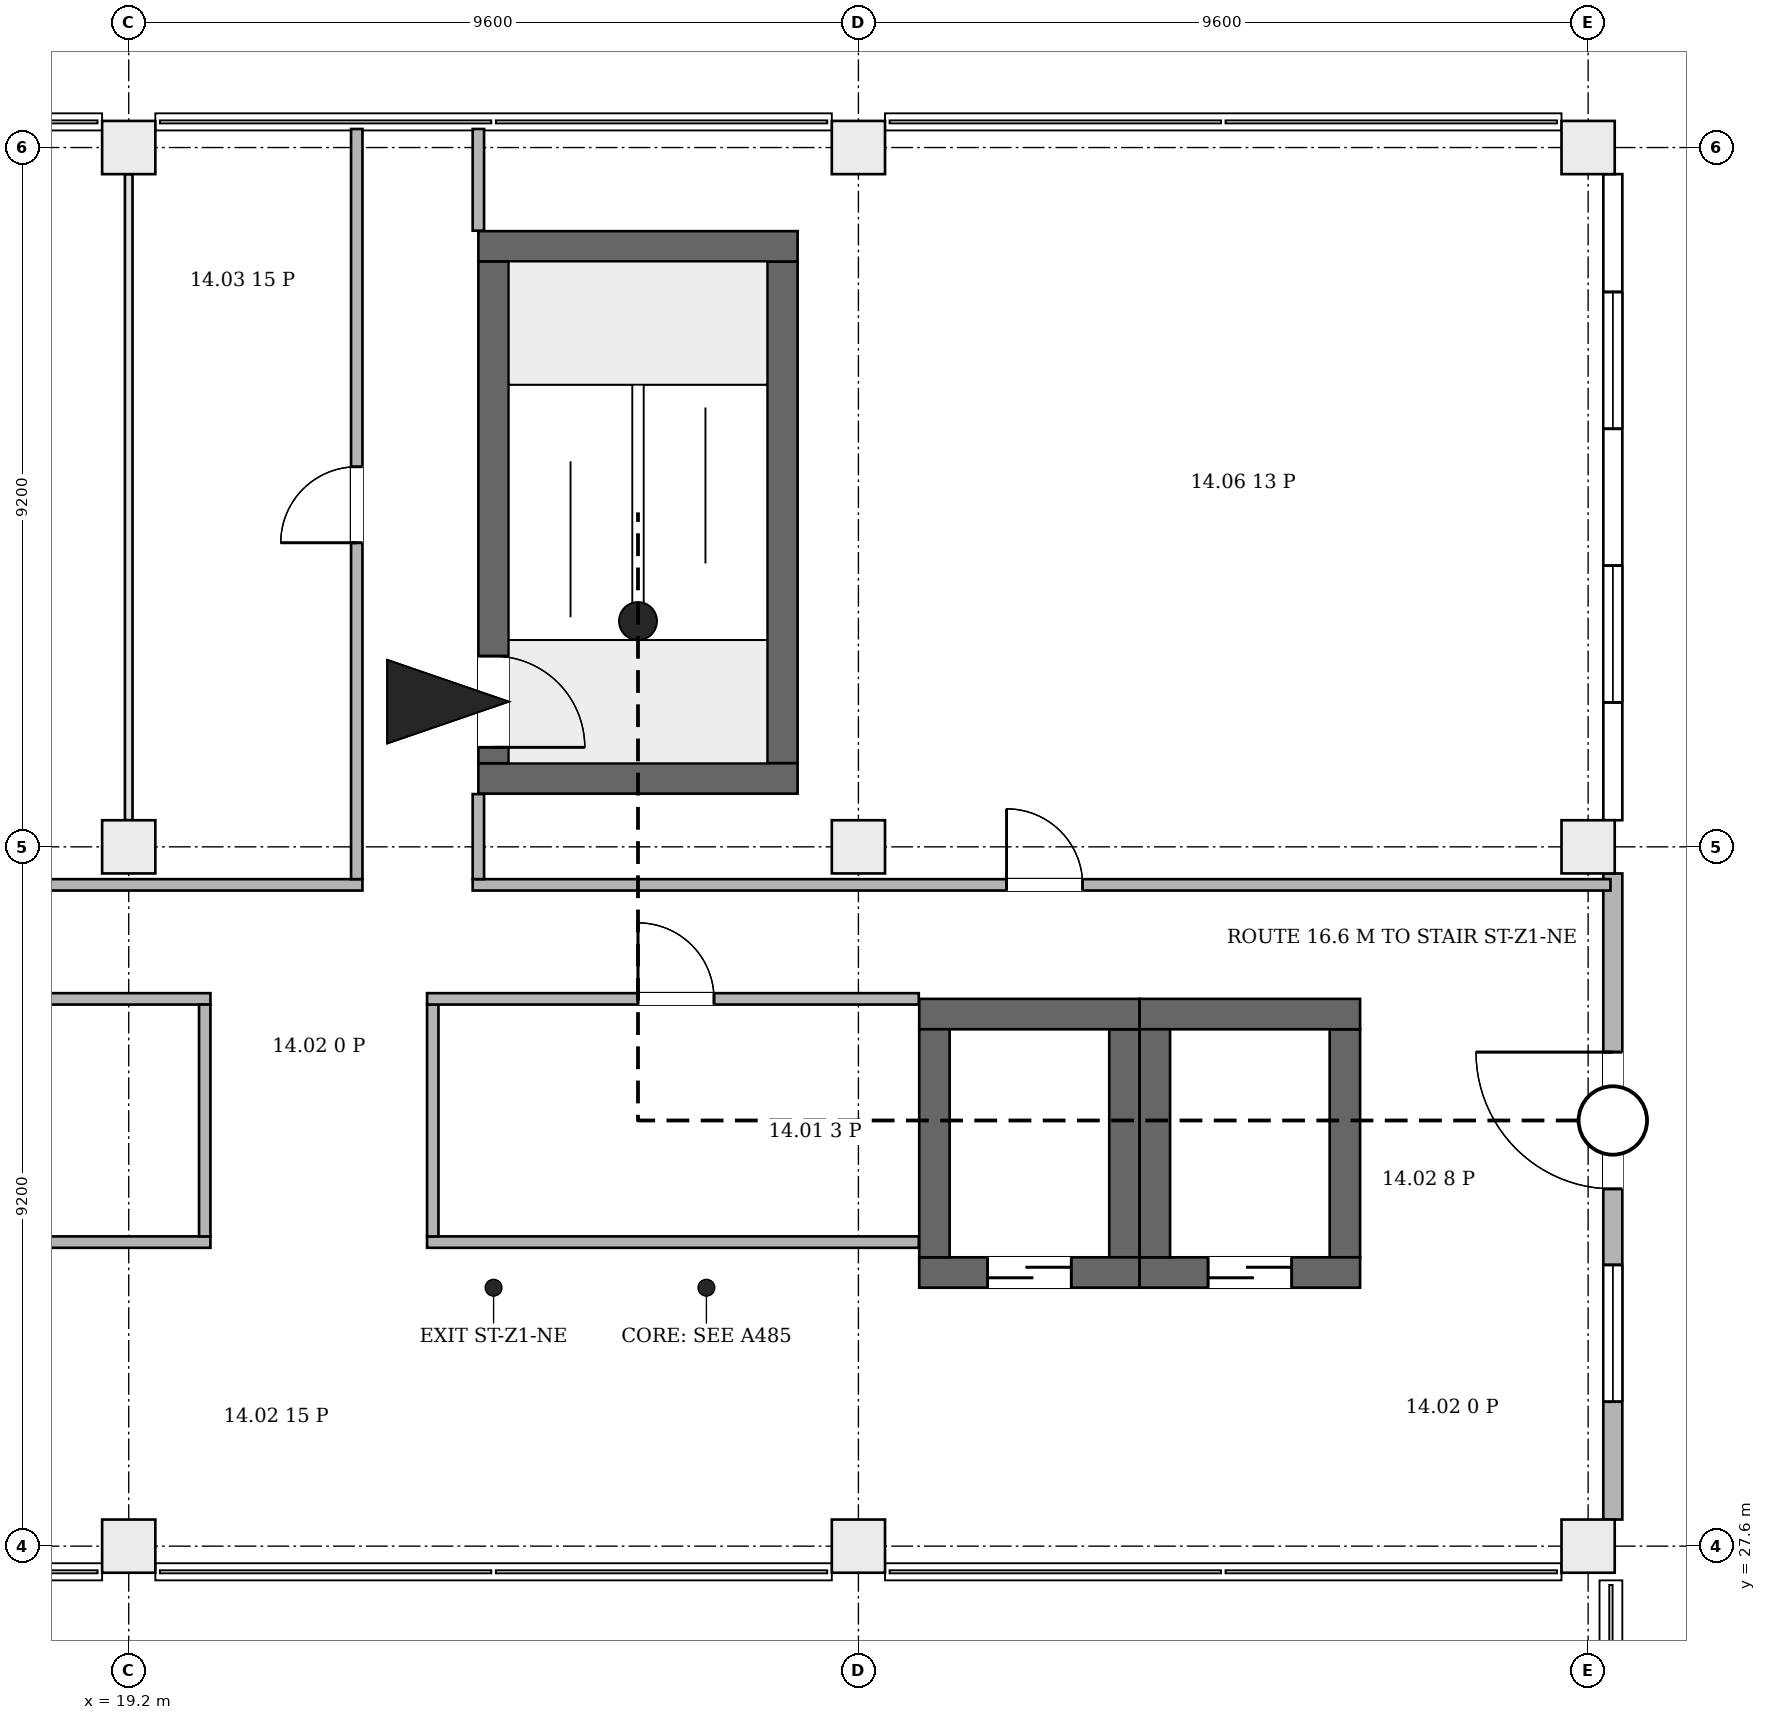
"""IFC4 building model, lengths in metres.
Left out: names, types, materials, properties, quantities, classifications, styles, units other than length and angle.
Written with IfcOpenShell. Run it as: python <this file> out.ifc"""

import sys

from ifc_helpers import new_model, si_unit, direction, frame, frame_2d, origin, origin_2d, place, context, subcontext, project, spatial, rectangle, extrude, element, fill, save


model = new_model("IFC4")
c1 = context("Model", 3, precision=1e-05, world=origin(), true_north=direction((0.0, 1.0)))
c2 = subcontext(c1, "Body", "Model", "MODEL_VIEW")
j1 = project(units=[si_unit("LENGTHUNIT", "METRE"), si_unit("PLANEANGLEUNIT", "RADIAN")], contexts=[c1])
p1 = place(None, origin())
s1 = spatial("IfcSite", under=j1, at=p1, CompositionType="ELEMENT")
p2 = place(p1, origin())
s2 = spatial("IfcBuilding", under=s1, at=p2, CompositionType="ELEMENT")
p3 = place(p2, frame((0.0, 0.0, 69.7)))
s3 = spatial("IfcBuildingStorey", under=s2, at=p3, CompositionType="ELEMENT", Elevation=69.7)
for number, where, z_axis, x_axis in (
    (1, (23.8, 37.7, 0.0), (0.0, 0.0, 1.0), (1.0, 0.0, 0.0)),
    (2, (23.8, 44.7, 0.0), (0.0, 0.0, 1.0), (1.0, 0.0, 0.0)),
):
    element("IfcWall", number, at=place(p3, frame(where, z_axis=z_axis, x_axis=x_axis)), inside=s3, PredefinedType="SHEAR", context=c2, shape_type="SweptSolid", body=[
        extrude(rectangle(XDim=4.2, YDim=0.4, at=frame_2d((2.1, 0.0))), origin(), (0.0, 0.0, 1.0), 4.2),
    ])
p4 = place(p3, frame((24.0, 37.9, 0.0), z_axis=(0.0, 0.0, 1.0), x_axis=(0.0, 1.0, 0.0)))
e3 = element("IfcWall", 3, at=p4, inside=s3, PredefinedType="SHEAR", context=c2, shape_type="SweptSolid", body=[
    extrude(rectangle(XDim=6.6, YDim=0.4, at=frame_2d((3.3, 0.0))), origin(), (0.0, 0.0, 1.0), 4.2),
])
p5 = place(p4, frame((0.21, 0.0, 0.0)))
e4 = element("IfcOpeningElement", 4, at=p5, cuts=e3, PredefinedType="OPENING", context=c2, shape_type="SweptSolid", body=[
    extrude(rectangle(XDim=1.2, YDim=2.1, at=frame_2d((0.6, 1.05))), frame((0.0, 0.21, 0.0), z_axis=(0.0, -1.0, 0.0), x_axis=(1.0, 0.0, 0.0)), (0.0, 0.0, 1.0), 0.42),
])
p6 = place(p3, frame((27.8, 37.9, 0.0), z_axis=(0.0, 0.0, 1.0), x_axis=(0.0, 1.0, 0.0)))
e5 = element("IfcWall", 5, at=p6, inside=s3, PredefinedType="SHEAR", context=c2, shape_type="SweptSolid", body=[
    extrude(rectangle(XDim=6.6, YDim=0.4, at=frame_2d((3.3, 0.0))), origin(), (0.0, 0.0, 1.0), 4.2),
])
p7 = place(p3, frame((29.6, 31.2, 0.0), z_axis=(0.0, 0.0, 1.0), x_axis=(1.0, 0.0, 0.0)))
e6 = element("IfcWall", 6, at=p7, inside=s3, PredefinedType="SHEAR", context=c2, shape_type="SweptSolid", body=[
    extrude(rectangle(XDim=2.9, YDim=0.4, at=frame_2d((1.45, 0.0))), origin(), (0.0, 0.0, 1.0), 4.2),
])
p8 = place(p7, frame((0.9, 0.0, 0.0)))
e7 = element("IfcOpeningElement", 7, at=p8, cuts=e6, PredefinedType="OPENING", context=c2, shape_type="SweptSolid", body=[
    extrude(rectangle(XDim=1.1, YDim=2.1, at=frame_2d((0.55, 1.05))), frame((0.0, 0.21, 0.0), z_axis=(0.0, -1.0, 0.0), x_axis=(1.0, 0.0, 0.0)), (0.0, 0.0, 1.0), 0.42),
])
p9 = place(p3, frame((29.6, 34.6, 0.0), z_axis=(0.0, 0.0, 1.0), x_axis=(1.0, 0.0, 0.0)))
e8 = element("IfcWall", 8, at=p9, inside=s3, PredefinedType="SHEAR", context=c2, shape_type="SweptSolid", body=[
    extrude(rectangle(XDim=2.9, YDim=0.4, at=frame_2d((1.45, 0.0))), origin(), (0.0, 0.0, 1.0), 4.2),
])
for number, where, z_axis, x_axis in (
    (9, (29.8, 31.4, 0.0), (0.0, 0.0, 1.0), (0.0, 1.0, 0.0)),
    (10, (32.3, 31.4, 0.0), (0.0, 0.0, 1.0), (0.0, 1.0, 0.0)),
):
    element("IfcWall", number, at=place(p3, frame(where, z_axis=z_axis, x_axis=x_axis)), inside=s3, PredefinedType="SHEAR", context=c2, shape_type="SweptSolid", body=[
        extrude(rectangle(XDim=3.0, YDim=0.4, at=frame_2d((1.5, 0.0))), origin(), (0.0, 0.0, 1.0), 4.2),
    ])
p10 = place(p3, frame((32.5, 31.2, 0.0), z_axis=(0.0, 0.0, 1.0), x_axis=(1.0, 0.0, 0.0)))
e11 = element("IfcWall", 11, at=p10, inside=s3, PredefinedType="SHEAR", context=c2, shape_type="SweptSolid", body=[
    extrude(rectangle(XDim=2.9, YDim=0.4, at=frame_2d((1.45, 0.0))), origin(), (0.0, 0.0, 1.0), 4.2),
])
p11 = place(p10, frame((0.9, 0.0, 0.0)))
e12 = element("IfcOpeningElement", 12, at=p11, cuts=e11, PredefinedType="OPENING", context=c2, shape_type="SweptSolid", body=[
    extrude(rectangle(XDim=1.1, YDim=2.1, at=frame_2d((0.55, 1.05))), frame((0.0, 0.21, 0.0), z_axis=(0.0, -1.0, 0.0), x_axis=(1.0, 0.0, 0.0)), (0.0, 0.0, 1.0), 0.42),
])
p12 = place(p3, frame((32.5, 34.6, 0.0), z_axis=(0.0, 0.0, 1.0), x_axis=(1.0, 0.0, 0.0)))
e13 = element("IfcWall", 13, at=p12, inside=s3, PredefinedType="SHEAR", context=c2, shape_type="SweptSolid", body=[
    extrude(rectangle(XDim=2.9, YDim=0.4, at=frame_2d((1.45, 0.0))), origin(), (0.0, 0.0, 1.0), 4.2),
])
for number, where, z_axis, x_axis in (
    (14, (32.7, 31.4, 0.0), (0.0, 0.0, 1.0), (0.0, 1.0, 0.0)),
    (15, (35.2, 31.4, 0.0), (0.0, 0.0, 1.0), (0.0, 1.0, 0.0)),
):
    element("IfcWall", number, at=place(p3, frame(where, z_axis=z_axis, x_axis=x_axis)), inside=s3, PredefinedType="SHEAR", context=c2, shape_type="SweptSolid", body=[
        extrude(rectangle(XDim=3.0, YDim=0.4, at=frame_2d((1.5, 0.0))), origin(), (0.0, 0.0, 1.0), 4.2),
    ])
for number, where, z_axis, x_axis in (
    (16, (19.2, 27.6, 0.0), (0.0, 0.0, 1.0), (1.0, 0.0, 0.0)),
    (17, (28.8, 27.6, 0.0), (0.0, 0.0, 1.0), (1.0, 0.0, 0.0)),
    (18, (38.4, 27.6, 0.0), (0.0, 0.0, 1.0), (1.0, 0.0, 0.0)),
    (19, (19.2, 36.8, 0.0), (0.0, 0.0, 1.0), (1.0, 0.0, 0.0)),
    (20, (28.8, 36.8, 0.0), (0.0, 0.0, 1.0), (1.0, 0.0, 0.0)),
    (21, (38.4, 36.8, 0.0), (0.0, 0.0, 1.0), (1.0, 0.0, 0.0)),
    (22, (19.2, 46.0, 0.0), (0.0, 0.0, 1.0), (1.0, 0.0, 0.0)),
    (23, (28.8, 46.0, 0.0), (0.0, 0.0, 1.0), (1.0, 0.0, 0.0)),
    (24, (38.4, 46.0, 0.0), (0.0, 0.0, 1.0), (1.0, 0.0, 0.0)),
):
    element("IfcColumn", number, at=place(p3, frame(where, z_axis=z_axis, x_axis=x_axis)), inside=s3, PredefinedType="COLUMN", context=c2, shape_type="SweptSolid", body=[
        extrude(rectangle(XDim=0.7, YDim=0.7, at=origin_2d()), origin(), (0.0, 0.0, 1.0), 4.2),
    ])
p13 = place(p3, frame((38.725, 27.95, 0.0), z_axis=(0.0, 0.0, 1.0), x_axis=(0.0, 1.0, 0.0)))
e25 = element("IfcWall", 25, at=p13, inside=s3, PredefinedType="ELEMENTEDWALL", context=c2, shape_type="SweptSolid", body=[
    extrude(rectangle(XDim=8.5, YDim=0.25, at=frame_2d((4.25, 0.0))), origin(), (0.0, 0.0, 1.0), 3.9),
])
p14 = place(p13, frame((4.35, 0.0, 0.0)))
e26 = element("IfcOpeningElement", 26, at=p14, cuts=e25, PredefinedType="OPENING", context=c2, shape_type="SweptSolid", body=[
    extrude(rectangle(XDim=1.8, YDim=2.4, at=frame_2d((0.9, 1.2))), frame((0.0, 0.135, 0.0), z_axis=(0.0, -1.0, 0.0), x_axis=(1.0, 0.0, 0.0)), (0.0, 0.0, 1.0), 0.27),
])
p15 = place(p13, frame((1.55, 0.0, 0.9)))
e27 = element("IfcOpeningElement", 27, at=p15, cuts=e25, PredefinedType="OPENING", context=c2, shape_type="SweptSolid", body=[
    extrude(rectangle(XDim=1.8, YDim=2.6, at=frame_2d((0.9, 1.3))), frame((0.0, 0.135, 0.0), z_axis=(0.0, -1.0, 0.0), x_axis=(1.0, 0.0, 0.0)), (0.0, 0.0, 1.0), 0.27),
])
p16 = place(p3, frame((38.725, 37.15, 0.0), z_axis=(0.0, 0.0, 1.0), x_axis=(0.0, 1.0, 0.0)))
e28 = element("IfcWall", 28, at=p16, inside=s3, PredefinedType="ELEMENTEDWALL", context=c2, shape_type="SweptSolid", body=[
    extrude(rectangle(XDim=8.5, YDim=0.25, at=frame_2d((4.25, 0.0))), origin(), (0.0, 0.0, 1.0), 3.9),
])
p17 = place(p16, frame((1.55, 0.0, 0.9)))
e29 = element("IfcOpeningElement", 29, at=p17, cuts=e28, PredefinedType="OPENING", context=c2, shape_type="SweptSolid", body=[
    extrude(rectangle(XDim=1.8, YDim=2.6, at=frame_2d((0.9, 1.3))), frame((0.0, 0.135, 0.0), z_axis=(0.0, -1.0, 0.0), x_axis=(1.0, 0.0, 0.0)), (0.0, 0.0, 1.0), 0.27),
])
p18 = place(p16, frame((5.15, 0.0, 0.9)))
e30 = element("IfcOpeningElement", 30, at=p18, cuts=e28, PredefinedType="OPENING", context=c2, shape_type="SweptSolid", body=[
    extrude(rectangle(XDim=1.8, YDim=2.6, at=frame_2d((0.9, 1.3))), frame((0.0, 0.135, 0.0), z_axis=(0.0, -1.0, 0.0), x_axis=(1.0, 0.0, 0.0)), (0.0, 0.0, 1.0), 0.27),
])
p19 = place(p3, frame((11.225, 36.3, 0.0), z_axis=(0.0, 0.0, 1.0), x_axis=(1.0, 0.0, 0.0)))
e31 = element("IfcWall", 31, at=p19, inside=s3, PredefinedType="PARTITIONING", context=c2, shape_type="SweptSolid", body=[
    extrude(rectangle(XDim=11.05, YDim=0.15, at=frame_2d((5.525, 0.0))), origin(), (0.0, 0.0, 1.0), 3.9),
])
p20 = place(p3, frame((13.425, 34.8, 0.0), z_axis=(0.0, 0.0, 1.0), x_axis=(1.0, 0.0, 0.0)))
e32 = element("IfcWall", 32, at=p20, inside=s3, PredefinedType="PARTITIONING", context=c2, shape_type="SweptSolid", body=[
    extrude(rectangle(XDim=6.85, YDim=0.15, at=frame_2d((3.425, 0.0))), origin(), (0.0, 0.0, 1.0), 3.9),
])
p21 = place(p20, frame((2.925, 0.0, 0.0)))
e33 = element("IfcOpeningElement", 33, at=p21, cuts=e32, PredefinedType="OPENING", context=c2, shape_type="SweptSolid", body=[
    extrude(rectangle(XDim=1.0, YDim=2.1, at=frame_2d((0.5, 1.05))), frame((0.0, 0.085, 0.0), z_axis=(0.0, -1.0, 0.0), x_axis=(1.0, 0.0, 0.0)), (0.0, 0.0, 1.0), 0.17),
])
p22 = place(p3, frame((13.506, 31.6, 0.0), z_axis=(0.0, 0.0, 1.0), x_axis=(1.0, 0.0, 0.0)))
e34 = element("IfcWall", 34, at=p22, inside=s3, PredefinedType="PARTITIONING", context=c2, shape_type="SweptSolid", body=[
    extrude(rectangle(XDim=6.769, YDim=0.15, at=frame_2d((3.384, 0.0))), origin(), (0.0, 0.0, 1.0), 3.9),
])
p23 = place(p3, frame((19.2, 37.15, 0.0), z_axis=(0.0, 0.0, 1.0), x_axis=(0.0, 1.0, 0.0)))
e35 = element("IfcWall", 35, at=p23, inside=s3, PredefinedType="PARTITIONING", context=c2, shape_type="SweptSolid", body=[
    extrude(rectangle(XDim=8.5, YDim=0.1, at=frame_2d((4.25, 0.0))), origin(), (0.0, 0.0, 1.0), 3.9),
])
p24 = place(p3, frame((20.2, 31.675, 0.0), z_axis=(0.0, 0.0, 1.0), x_axis=(0.0, 1.0, 0.0)))
e36 = element("IfcWall", 36, at=p24, inside=s3, PredefinedType="PARTITIONING", context=c2, shape_type="SweptSolid", body=[
    extrude(rectangle(XDim=3.05, YDim=0.15, at=frame_2d((1.525, 0.0))), origin(), (0.0, 0.0, 1.0), 3.9),
])
p25 = place(p3, frame((22.2, 36.375, 0.0), z_axis=(0.0, 0.0, 1.0), x_axis=(0.0, 1.0, 0.0)))
e37 = element("IfcWall", 37, at=p25, inside=s3, PredefinedType="PARTITIONING", context=c2, shape_type="SweptSolid", body=[
    extrude(rectangle(XDim=9.869, YDim=0.15, at=frame_2d((4.935, 0.0))), origin(), (0.0, 0.0, 1.0), 3.9),
])
p26 = place(p25, frame((4.425, 0.0, 0.0)))
e38 = element("IfcOpeningElement", 38, at=p26, cuts=e37, PredefinedType="OPENING", context=c2, shape_type="SweptSolid", body=[
    extrude(rectangle(XDim=1.0, YDim=2.1, at=frame_2d((0.5, 1.05))), frame((0.0, 0.085, 0.0), z_axis=(0.0, -1.0, 0.0), x_axis=(1.0, 0.0, 0.0)), (0.0, 0.0, 1.0), 0.17),
])
p27 = place(p3, frame((23.125, 31.6, 0.0), z_axis=(0.0, 0.0, 1.0), x_axis=(1.0, 0.0, 0.0)))
e39 = element("IfcWall", 39, at=p27, inside=s3, PredefinedType="PARTITIONING", context=c2, shape_type="SweptSolid", body=[
    extrude(rectangle(XDim=6.469, YDim=0.15, at=frame_2d((3.234, 0.0))), origin(), (0.0, 0.0, 1.0), 3.9),
])
p28 = place(p3, frame((23.2, 31.675, 0.0), z_axis=(0.0, 0.0, 1.0), x_axis=(0.0, 1.0, 0.0)))
e40 = element("IfcWall", 40, at=p28, inside=s3, PredefinedType="PARTITIONING", context=c2, shape_type="SweptSolid", body=[
    extrude(rectangle(XDim=3.05, YDim=0.15, at=frame_2d((1.525, 0.0))), origin(), (0.0, 0.0, 1.0), 3.9),
])
p29 = place(p3, frame((23.125, 34.8, 0.0), z_axis=(0.0, 0.0, 1.0), x_axis=(1.0, 0.0, 0.0)))
e41 = element("IfcWall", 41, at=p29, inside=s3, PredefinedType="PARTITIONING", context=c2, shape_type="SweptSolid", body=[
    extrude(rectangle(XDim=6.469, YDim=0.15, at=frame_2d((3.234, 0.0))), origin(), (0.0, 0.0, 1.0), 3.9),
])
p30 = place(p29, frame((2.775, 0.0, 0.0)))
e42 = element("IfcOpeningElement", 42, at=p30, cuts=e41, PredefinedType="OPENING", context=c2, shape_type="SweptSolid", body=[
    extrude(rectangle(XDim=1.0, YDim=2.1, at=frame_2d((0.5, 1.05))), frame((0.0, 0.085, 0.0), z_axis=(0.0, -1.0, 0.0), x_axis=(1.0, 0.0, 0.0)), (0.0, 0.0, 1.0), 0.17),
])
p31 = place(p3, frame((23.725, 36.3, 0.0), z_axis=(0.0, 0.0, 1.0), x_axis=(1.0, 0.0, 0.0)))
e43 = element("IfcWall", 43, at=p31, inside=s3, PredefinedType="PARTITIONING", context=c2, shape_type="SweptSolid", body=[
    extrude(rectangle(XDim=14.969, YDim=0.15, at=frame_2d((7.484, 0.0))), origin(), (0.0, 0.0, 1.0), 3.9),
])
p32 = place(p31, frame((7.025, 0.0, 0.0)))
e44 = element("IfcOpeningElement", 44, at=p32, cuts=e43, PredefinedType="OPENING", context=c2, shape_type="SweptSolid", body=[
    extrude(rectangle(XDim=1.0, YDim=2.1, at=frame_2d((0.5, 1.05))), frame((0.0, 0.085, 0.0), z_axis=(0.0, -1.0, 0.0), x_axis=(1.0, 0.0, 0.0)), (0.0, 0.0, 1.0), 0.17),
])
p33 = place(p3, frame((23.8, 36.375, 0.0), z_axis=(0.0, 0.0, 1.0), x_axis=(0.0, 1.0, 0.0)))
e45 = element("IfcWall", 45, at=p33, inside=s3, PredefinedType="PARTITIONING", context=c2, shape_type="SweptSolid", body=[
    extrude(rectangle(XDim=1.119, YDim=0.15, at=frame_2d((0.56, 0.0))), origin(), (0.0, 0.0, 1.0), 3.9),
])
p34 = place(p3, frame((23.8, 44.906, 0.0), z_axis=(0.0, 0.0, 1.0), x_axis=(0.0, 1.0, 0.0)))
e46 = element("IfcWall", 46, at=p34, inside=s3, PredefinedType="PARTITIONING", context=c2, shape_type="SweptSolid", body=[
    extrude(rectangle(XDim=1.338, YDim=0.15, at=frame_2d((0.669, 0.0))), origin(), (0.0, 0.0, 1.0), 3.9),
])
p35 = place(p14, frame((1.8, 0.0, 0.0), z_axis=(0.0, 0.0, 1.0), x_axis=(-1.0, 0.0, 0.0)))
e47 = element("IfcDoor", 47, at=p35, inside=s3, OperationType="DOUBLE_DOOR_SINGLE_SWING", PredefinedType="DOOR", context=c2, shape_type="SweptSolid", body=[
    extrude(rectangle(XDim=1.8, YDim=2.4, at=frame_2d((0.9, 1.2))), frame((0.0, 0.025, 0.0), z_axis=(0.0, -1.0, 0.0), x_axis=(1.0, 0.0, 0.0)), (0.0, 0.0, 1.0), 0.05),
])
fill(e26, e47)
p36 = place(p15, origin())
e48 = element("IfcWindow", 48, at=p36, inside=s3, PartitioningType="SINGLE_PANEL", PredefinedType="WINDOW", context=c2, shape_type="SweptSolid", body=[
    extrude(rectangle(XDim=1.8, YDim=2.6, at=frame_2d((0.9, 1.3))), frame((0.0, 0.03, 0.0), z_axis=(0.0, -1.0, 0.0), x_axis=(1.0, 0.0, 0.0)), (0.0, 0.0, 1.0), 0.06),
])
fill(e27, e48)
p37 = place(p17, origin())
e49 = element("IfcWindow", 49, at=p37, inside=s3, PartitioningType="SINGLE_PANEL", PredefinedType="WINDOW", context=c2, shape_type="SweptSolid", body=[
    extrude(rectangle(XDim=1.8, YDim=2.6, at=frame_2d((0.9, 1.3))), frame((0.0, 0.03, 0.0), z_axis=(0.0, -1.0, 0.0), x_axis=(1.0, 0.0, 0.0)), (0.0, 0.0, 1.0), 0.06),
])
fill(e29, e49)
p38 = place(p18, origin())
e50 = element("IfcWindow", 50, at=p38, inside=s3, PartitioningType="SINGLE_PANEL", PredefinedType="WINDOW", context=c2, shape_type="SweptSolid", body=[
    extrude(rectangle(XDim=1.8, YDim=2.6, at=frame_2d((0.9, 1.3))), frame((0.0, 0.03, 0.0), z_axis=(0.0, -1.0, 0.0), x_axis=(1.0, 0.0, 0.0)), (0.0, 0.0, 1.0), 0.06),
])
fill(e30, e50)
p39 = place(p5, origin())
e51 = element("IfcDoor", 51, at=p39, inside=s3, OperationType="SINGLE_SWING_LEFT", PredefinedType="DOOR", context=c2, shape_type="SweptSolid", body=[
    extrude(rectangle(XDim=1.2, YDim=2.1, at=frame_2d((0.6, 1.05))), frame((0.0, 0.025, 0.0), z_axis=(0.0, -1.0, 0.0), x_axis=(1.0, 0.0, 0.0)), (0.0, 0.0, 1.0), 0.05),
])
fill(e4, e51)
p40 = place(p8, origin())
e52 = element("IfcDoor", 52, at=p40, inside=s3, OperationType="DOUBLE_DOOR_SLIDING", PredefinedType="DOOR", context=c2, shape_type="SweptSolid", body=[
    extrude(rectangle(XDim=1.1, YDim=2.1, at=frame_2d((0.55, 1.05))), frame((0.0, 0.025, 0.0), z_axis=(0.0, -1.0, 0.0), x_axis=(1.0, 0.0, 0.0)), (0.0, 0.0, 1.0), 0.05),
])
fill(e7, e52)
p41 = place(p11, origin())
e53 = element("IfcDoor", 53, at=p41, inside=s3, OperationType="DOUBLE_DOOR_SLIDING", PredefinedType="DOOR", context=c2, shape_type="SweptSolid", body=[
    extrude(rectangle(XDim=1.1, YDim=2.1, at=frame_2d((0.55, 1.05))), frame((0.0, 0.025, 0.0), z_axis=(0.0, -1.0, 0.0), x_axis=(1.0, 0.0, 0.0)), (0.0, 0.0, 1.0), 0.05),
])
fill(e12, e53)
p42 = place(p30, origin())
e54 = element("IfcDoor", 54, at=p42, inside=s3, OperationType="SINGLE_SWING_LEFT", PredefinedType="DOOR", context=c2, shape_type="SweptSolid", body=[
    extrude(rectangle(XDim=1.0, YDim=2.1, at=frame_2d((0.5, 1.05))), frame((0.0, 0.025, 0.0), z_axis=(0.0, -1.0, 0.0), x_axis=(1.0, 0.0, 0.0)), (0.0, 0.0, 1.0), 0.05),
])
fill(e42, e54)
p43 = place(p26, origin())
e55 = element("IfcDoor", 55, at=p43, inside=s3, OperationType="SINGLE_SWING_RIGHT", PredefinedType="DOOR", context=c2, shape_type="SweptSolid", body=[
    extrude(rectangle(XDim=1.0, YDim=2.1, at=frame_2d((0.5, 1.05))), frame((0.0, 0.025, 0.0), z_axis=(0.0, -1.0, 0.0), x_axis=(1.0, 0.0, 0.0)), (0.0, 0.0, 1.0), 0.05),
])
fill(e38, e55)
p44 = place(p32, origin())
e56 = element("IfcDoor", 56, at=p44, inside=s3, OperationType="SINGLE_SWING_RIGHT", PredefinedType="DOOR", context=c2, shape_type="SweptSolid", body=[
    extrude(rectangle(XDim=1.0, YDim=2.1, at=frame_2d((0.5, 1.05))), frame((0.0, 0.025, 0.0), z_axis=(0.0, -1.0, 0.0), x_axis=(1.0, 0.0, 0.0)), (0.0, 0.0, 1.0), 0.05),
])
fill(e44, e56)
save(model, sys.argv[1])
